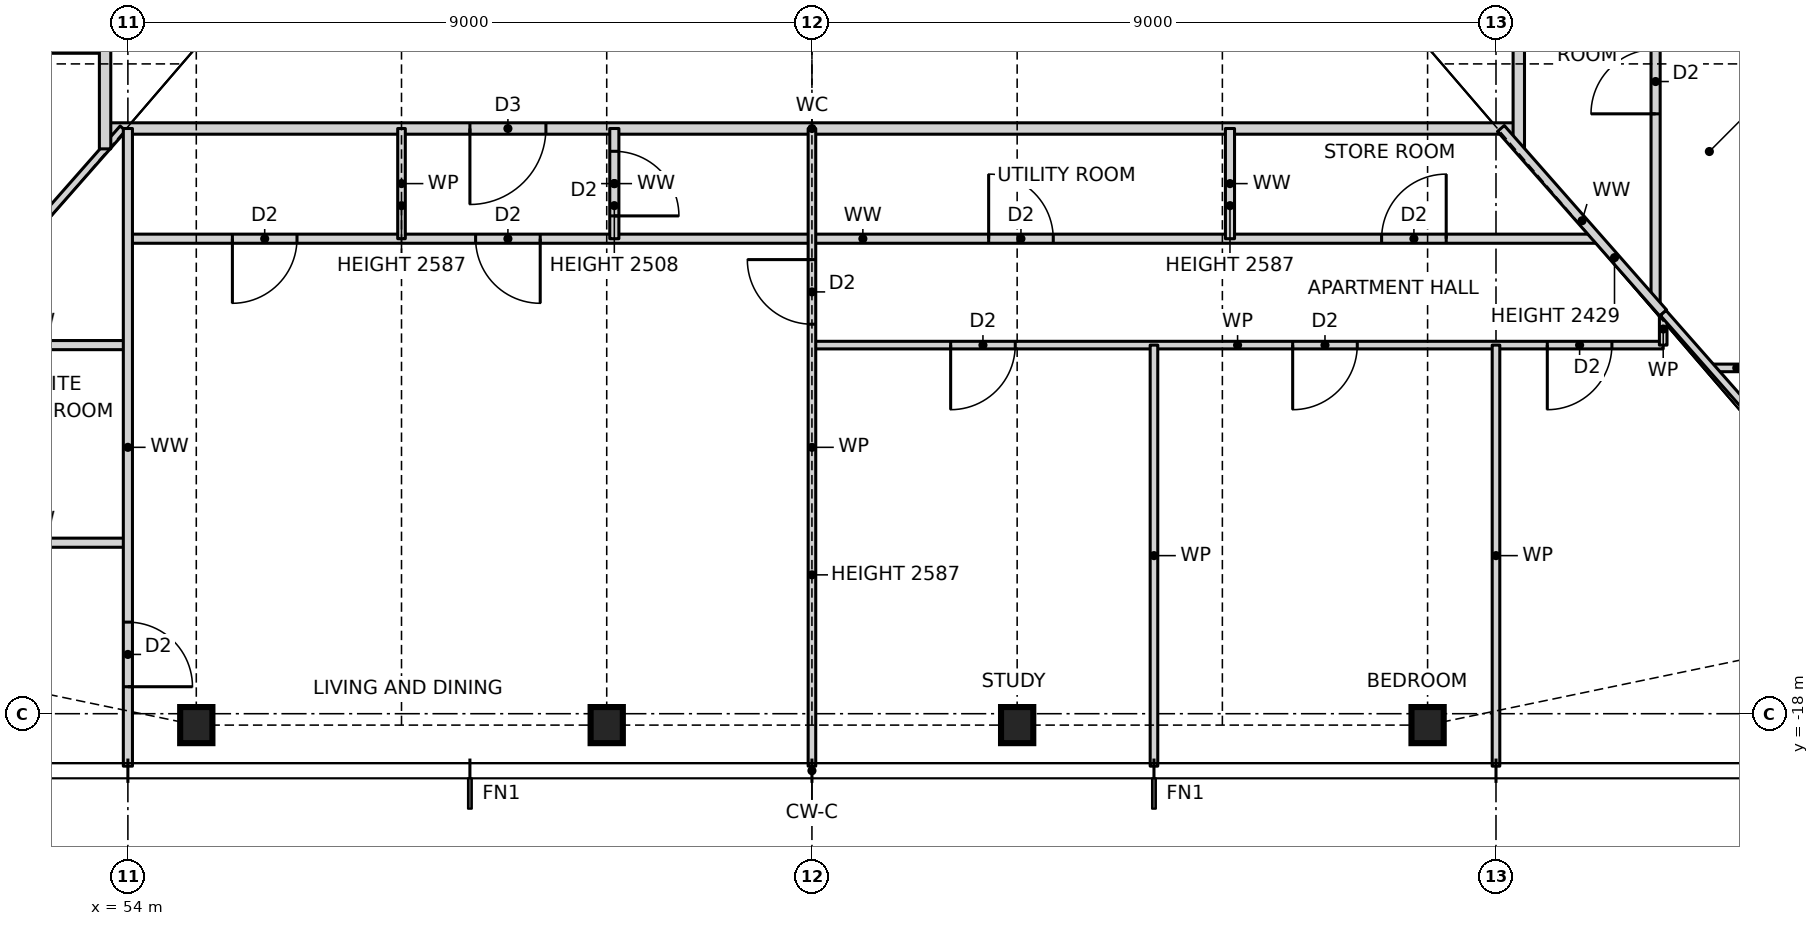
"""IFC4 building model, lengths in metres.
Left out: names, types, materials, properties, quantities, classifications, styles, units other than length and angle.
Written with IfcOpenShell. Run it as: python <this file> out.ifc"""

import sys

from ifc_helpers import new_model, si_unit, direction, frame, frame_2d, origin, origin_2d, place, context, subcontext, project, spatial, rectangle, i_section, extrude, element, fill, save


model = new_model("IFC4")
c1 = context("Model", 3, precision=1e-05, world=origin(), true_north=direction((0.0, 1.0)))
c2 = subcontext(c1, "Body", "Model", "MODEL_VIEW")
j1 = project(units=[si_unit("LENGTHUNIT", "METRE"), si_unit("PLANEANGLEUNIT", "RADIAN")], contexts=[c1])
p1 = place(None, origin())
s1 = spatial("IfcSite", under=j1, at=p1, CompositionType="ELEMENT")
p2 = place(p1, origin())
s2 = spatial("IfcBuilding", under=s1, at=p2, CompositionType="ELEMENT")
p3 = place(p2, frame((0.0, 0.0, 46.5)))
s3 = spatial("IfcBuildingStorey", under=s2, at=p3, CompositionType="ELEMENT", Elevation=46.5)
for number, where, z_axis, x_axis in (
    (1, (54.9, -18.15, 0.0), (0.0, 0.0, 1.0), (1.0, 0.0, 0.0)),
    (2, (60.3, -18.15, 0.0), (0.0, 0.0, 1.0), (1.0, 0.0, 0.0)),
    (3, (65.7, -18.15, 0.0), (0.0, 0.0, 1.0), (1.0, 0.0, 0.0)),
    (4, (71.1, -18.15, 0.0), (0.0, 0.0, 1.0), (1.0, 0.0, 0.0)),
):
    element("IfcColumn", number, at=place(p3, frame(where, z_axis=z_axis, x_axis=x_axis)), inside=s3, PredefinedType="COLUMN", context=c2, shape_type="SweptSolid", body=[
        extrude(i_section(OverallWidth=0.424, OverallDepth=0.475, WebThickness=0.048, FlangeThickness=0.077, at=origin_2d()), origin(), (0.0, 0.0, 1.0), 3.5),
    ])
p4 = place(p3, frame((51.6, -15.75, 0.0), z_axis=(0.0, 0.0, 1.0), x_axis=(1.0, 0.0, 0.0)))
e5 = element("IfcWall", 5, at=p4, inside=s3, PredefinedType="PARTITIONING", context=c2, shape_type="SweptSolid", body=[
    extrude(rectangle(XDim=2.4, YDim=0.12, at=frame_2d((1.2, 0.0))), origin(), (0.0, 0.0, 1.0), 3.27),
])
p5 = place(p3, frame((74.836, -13.45, 0.0), z_axis=(0.0, 0.0, 1.0), x_axis=(1.0, 0.0, 0.0)))
e6 = element("IfcWall", 6, at=p5, inside=s3, PredefinedType="PARTITIONING", context=c2, shape_type="SweptSolid", body=[
    extrude(rectangle(XDim=0.664, YDim=0.1, at=frame_2d((0.332, 0.0))), origin(), (0.0, 0.0, 1.0), 3.27),
])
p6 = place(p3, frame((51.6, -13.15, 0.0), z_axis=(0.0, 0.0, 1.0), x_axis=(1.0, 0.0, 0.0)))
e7 = element("IfcWall", 7, at=p6, inside=s3, PredefinedType="PARTITIONING", context=c2, shape_type="SweptSolid", body=[
    extrude(rectangle(XDim=2.4, YDim=0.12, at=frame_2d((1.2, 0.0))), origin(), (0.0, 0.0, 1.0), 3.27),
])
p7 = place(p3, frame((63.0, -13.15, 0.0), z_axis=(0.0, 0.0, 1.0), x_axis=(1.0, 0.0, 0.0)))
e8 = element("IfcWall", 8, at=p7, inside=s3, PredefinedType="PARTITIONING", context=c2, shape_type="SweptSolid", body=[
    extrude(rectangle(XDim=11.2, YDim=0.1, at=frame_2d((5.6, 0.0))), origin(), (0.0, 0.0, 1.0), 3.27),
])
p8 = place(p7, frame((1.825, 0.0, 0.0)))
e9 = element("IfcOpeningElement", 9, at=p8, cuts=e8, PredefinedType="OPENING", context=c2, shape_type="SweptSolid", body=[
    extrude(rectangle(XDim=0.85, YDim=2.1, at=frame_2d((0.425, 1.05))), frame((0.0, 0.06, 0.0), z_axis=(0.0, -1.0, 0.0), x_axis=(1.0, 0.0, 0.0)), (0.0, 0.0, 1.0), 0.12),
])
p9 = place(p7, frame((6.325, 0.0, 0.0)))
e10 = element("IfcOpeningElement", 10, at=p9, cuts=e8, PredefinedType="OPENING", context=c2, shape_type="SweptSolid", body=[
    extrude(rectangle(XDim=0.85, YDim=2.1, at=frame_2d((0.425, 1.05))), frame((0.0, 0.06, 0.0), z_axis=(0.0, -1.0, 0.0), x_axis=(1.0, 0.0, 0.0)), (0.0, 0.0, 1.0), 0.12),
])
p10 = place(p7, frame((9.675, 0.0, 0.0)))
e11 = element("IfcOpeningElement", 11, at=p10, cuts=e8, PredefinedType="OPENING", context=c2, shape_type="SweptSolid", body=[
    extrude(rectangle(XDim=0.85, YDim=2.1, at=frame_2d((0.425, 1.05))), frame((0.0, 0.06, 0.0), z_axis=(0.0, -1.0, 0.0), x_axis=(1.0, 0.0, 0.0)), (0.0, 0.0, 1.0), 0.12),
])
p11 = place(p3, frame((54.0, -11.75, 0.0), z_axis=(0.0, 0.0, 1.0), x_axis=(1.0, 0.0, 0.0)))
e12 = element("IfcWall", 12, at=p11, inside=s3, PredefinedType="PARTITIONING", context=c2, shape_type="SweptSolid", body=[
    extrude(rectangle(XDim=19.34, YDim=0.12, at=frame_2d((9.67, 0.0))), origin(), (0.0, 0.0, 1.0), 3.27),
])
p12 = place(p11, frame((1.375, 0.0, 0.0)))
e13 = element("IfcOpeningElement", 13, at=p12, cuts=e12, PredefinedType="OPENING", context=c2, shape_type="SweptSolid", body=[
    extrude(rectangle(XDim=0.85, YDim=2.1, at=frame_2d((0.425, 1.05))), frame((0.0, 0.07, 0.0), z_axis=(0.0, -1.0, 0.0), x_axis=(1.0, 0.0, 0.0)), (0.0, 0.0, 1.0), 0.14),
])
p13 = place(p11, frame((4.575, 0.0, 0.0)))
e14 = element("IfcOpeningElement", 14, at=p13, cuts=e12, PredefinedType="OPENING", context=c2, shape_type="SweptSolid", body=[
    extrude(rectangle(XDim=0.85, YDim=2.1, at=frame_2d((0.425, 1.05))), frame((0.0, 0.07, 0.0), z_axis=(0.0, -1.0, 0.0), x_axis=(1.0, 0.0, 0.0)), (0.0, 0.0, 1.0), 0.14),
])
p14 = place(p11, frame((11.325, 0.0, 0.0)))
e15 = element("IfcOpeningElement", 15, at=p14, cuts=e12, PredefinedType="OPENING", context=c2, shape_type="SweptSolid", body=[
    extrude(rectangle(XDim=0.85, YDim=2.1, at=frame_2d((0.425, 1.05))), frame((0.0, 0.07, 0.0), z_axis=(0.0, -1.0, 0.0), x_axis=(1.0, 0.0, 0.0)), (0.0, 0.0, 1.0), 0.14),
])
p15 = place(p11, frame((16.495, 0.0, 0.0)))
e16 = element("IfcOpeningElement", 16, at=p15, cuts=e12, PredefinedType="OPENING", context=c2, shape_type="SweptSolid", body=[
    extrude(rectangle(XDim=0.85, YDim=2.1, at=frame_2d((0.425, 1.05))), frame((0.0, 0.07, 0.0), z_axis=(0.0, -1.0, 0.0), x_axis=(1.0, 0.0, 0.0)), (0.0, 0.0, 1.0), 0.14),
])
p16 = place(p3, frame((53.7, -10.3, 0.0), z_axis=(0.0, 0.0, 1.0), x_axis=(1.0, 0.0, 0.0)))
e17 = element("IfcWall", 17, at=p16, inside=s3, PredefinedType="PARTITIONING", context=c2, shape_type="SweptSolid", body=[
    extrude(rectangle(XDim=18.6, YDim=0.15, at=frame_2d((9.3, 0.0))), origin(), (0.0, 0.0, 1.0), 3.27),
])
p17 = place(p16, frame((4.8, 0.0, 0.0)))
e18 = element("IfcOpeningElement", 18, at=p17, cuts=e17, PredefinedType="OPENING", context=c2, shape_type="SweptSolid", body=[
    extrude(rectangle(XDim=1.0, YDim=2.1, at=frame_2d((0.5, 1.05))), frame((0.0, 0.085, 0.0), z_axis=(0.0, -1.0, 0.0), x_axis=(1.0, 0.0, 0.0)), (0.0, 0.0, 1.0), 0.17),
])
p18 = place(p3, frame((51.9, -9.25, 0.0), z_axis=(0.0, 0.0, 1.0), x_axis=(1.0, 0.0, 0.0)))
e19 = element("IfcWall", 19, at=p18, inside=s3, PredefinedType="PARTITIONING", context=c2, shape_type="SweptSolid", body=[
    extrude(rectangle(XDim=1.8, YDim=0.12, at=frame_2d((0.9, 0.0))), origin(), (0.0, 0.0, 1.0), 3.27),
])
p19 = place(p3, frame((47.944, -17.109, 0.0), z_axis=(0.0, 0.0, 1.0), x_axis=(0.660638210404, 0.750704439146, 0.0)))
e20 = element("IfcWall", 20, at=p19, inside=s3, PredefinedType="PARTITIONING", context=c2, shape_type="SweptSolid", body=[
    extrude(rectangle(XDim=9.07, YDim=0.1, at=frame_2d((4.535, 0.0))), origin(), (0.0, 0.0, 1.0), 2.429),
])
p20 = place(p3, frame((74.2, -13.15, 0.0), z_axis=(0.0, 0.0, 1.0), x_axis=(0.0, 1.0, 0.0)))
e21 = element("IfcWall", 21, at=p20, inside=s3, PredefinedType="PARTITIONING", context=c2, shape_type="SweptSolid", body=[
    extrude(rectangle(XDim=0.423, YDim=0.1, at=frame_2d((0.211, 0.0))), origin(), (0.0, 0.0, 1.0), 3.27),
])
p21 = place(p3, frame((74.1, -12.614, 0.0), z_axis=(0.0, 0.0, 1.0), x_axis=(0.0, 1.0, 0.0)))
e22 = element("IfcWall", 22, at=p21, inside=s3, PredefinedType="PARTITIONING", context=c2, shape_type="SweptSolid", body=[
    extrude(rectangle(XDim=25.228, YDim=0.12, at=frame_2d((12.614, 0.0))), origin(), (0.0, 0.0, 1.0), 3.27),
])
p22 = place(p21, frame((7.239, 0.0, 0.0)))
e23 = element("IfcOpeningElement", 23, at=p22, cuts=e22, PredefinedType="OPENING", context=c2, shape_type="SweptSolid", body=[
    extrude(rectangle(XDim=0.85, YDim=2.1, at=frame_2d((0.425, 1.05))), frame((0.0, 0.07, 0.0), z_axis=(0.0, -1.0, 0.0), x_axis=(1.0, 0.0, 0.0)), (0.0, 0.0, 1.0), 0.14),
])
p23 = place(p21, frame((10.439, 0.0, 0.0)))
e24 = element("IfcOpeningElement", 24, at=p23, cuts=e22, PredefinedType="OPENING", context=c2, shape_type="SweptSolid", body=[
    extrude(rectangle(XDim=0.85, YDim=2.1, at=frame_2d((0.425, 1.05))), frame((0.0, 0.07, 0.0), z_axis=(0.0, -1.0, 0.0), x_axis=(1.0, 0.0, 0.0)), (0.0, 0.0, 1.0), 0.14),
])
p24 = place(p21, frame((2.507, 0.0, 0.0)))
e25 = element("IfcOpeningElement", 25, at=p24, cuts=e22, PredefinedType="OPENING", context=c2, shape_type="SweptSolid", body=[
    extrude(rectangle(XDim=0.85, YDim=2.1, at=frame_2d((0.425, 1.05))), frame((0.0, 0.07, 0.0), z_axis=(0.0, -1.0, 0.0), x_axis=(1.0, 0.0, 0.0)), (0.0, 0.0, 1.0), 0.14),
])
p25 = place(p21, frame((16.639, 0.0, 0.0)))
e26 = element("IfcOpeningElement", 26, at=p25, cuts=e22, PredefinedType="OPENING", context=c2, shape_type="SweptSolid", body=[
    extrude(rectangle(XDim=0.85, YDim=2.1, at=frame_2d((0.425, 1.05))), frame((0.0, 0.07, 0.0), z_axis=(0.0, -1.0, 0.0), x_axis=(1.0, 0.0, 0.0)), (0.0, 0.0, 1.0), 0.14),
])
p26 = place(p21, frame((21.821, 0.0, 0.0)))
e27 = element("IfcOpeningElement", 27, at=p26, cuts=e22, PredefinedType="OPENING", context=c2, shape_type="SweptSolid", body=[
    extrude(rectangle(XDim=0.85, YDim=2.1, at=frame_2d((0.425, 1.05))), frame((0.0, 0.07, 0.0), z_axis=(0.0, -1.0, 0.0), x_axis=(1.0, 0.0, 0.0)), (0.0, 0.0, 1.0), 0.14),
])
p27 = place(p3, frame((72.3, -10.568, 0.0), z_axis=(0.0, 0.0, 1.0), x_axis=(0.0, 1.0, 0.0)))
e28 = element("IfcWall", 28, at=p27, inside=s3, PredefinedType="PARTITIONING", context=c2, shape_type="SweptSolid", body=[
    extrude(rectangle(XDim=21.136, YDim=0.15, at=frame_2d((10.568, 0.0))), origin(), (0.0, 0.0, 1.0), 3.27),
])
p28 = place(p27, frame((8.318, 0.0, 0.0)))
e29 = element("IfcOpeningElement", 29, at=p28, cuts=e28, PredefinedType="OPENING", context=c2, shape_type="SweptSolid", body=[
    extrude(rectangle(XDim=1.0, YDim=2.1, at=frame_2d((0.5, 1.05))), frame((0.0, 0.085, 0.0), z_axis=(0.0, -1.0, 0.0), x_axis=(1.0, 0.0, 0.0)), (0.0, 0.0, 1.0), 0.17),
])
p29 = place(p3, frame((72.0, -18.69, 0.0), z_axis=(0.0, 0.0, 1.0), x_axis=(0.0, 1.0, 0.0)))
e30 = element("IfcWall", 30, at=p29, inside=s3, PredefinedType="PARTITIONING", context=c2, shape_type="SweptSolid", body=[
    extrude(rectangle(XDim=5.54, YDim=0.1, at=frame_2d((2.77, 0.0))), origin(), (0.0, 0.0, 1.0), 3.27),
])
p30 = place(p3, frame((68.5, -11.75, 0.0), z_axis=(0.0, 0.0, 1.0), x_axis=(0.0, 1.0, 0.0)))
e31 = element("IfcWall", 31, at=p30, inside=s3, PredefinedType="PARTITIONING", context=c2, shape_type="SweptSolid", body=[
    extrude(rectangle(XDim=1.45, YDim=0.12, at=frame_2d((0.725, 0.0))), origin(), (0.0, 0.0, 1.0), 2.587),
])
p31 = place(p3, frame((67.5, -18.69, 0.0), z_axis=(0.0, 0.0, 1.0), x_axis=(0.0, 1.0, 0.0)))
e32 = element("IfcWall", 32, at=p31, inside=s3, PredefinedType="PARTITIONING", context=c2, shape_type="SweptSolid", body=[
    extrude(rectangle(XDim=5.54, YDim=0.1, at=frame_2d((2.77, 0.0))), origin(), (0.0, 0.0, 1.0), 3.27),
])
p32 = place(p3, frame((63.0, -18.69, 0.0), z_axis=(0.0, 0.0, 1.0), x_axis=(0.0, 1.0, 0.0)))
e33 = element("IfcWall", 33, at=p32, inside=s3, PredefinedType="PARTITIONING", context=c2, shape_type="SweptSolid", body=[
    extrude(rectangle(XDim=8.39, YDim=0.1, at=frame_2d((4.195, 0.0))), origin(), (0.0, 0.0, 1.0), 2.587),
])
p33 = place(p32, frame((5.815, 0.0, 0.0)))
e34 = element("IfcOpeningElement", 34, at=p33, cuts=e33, PredefinedType="OPENING", context=c2, shape_type="SweptSolid", body=[
    extrude(rectangle(XDim=0.85, YDim=2.1, at=frame_2d((0.425, 1.05))), frame((0.0, 0.06, 0.0), z_axis=(0.0, -1.0, 0.0), x_axis=(1.0, 0.0, 0.0)), (0.0, 0.0, 1.0), 0.12),
])
p34 = place(p3, frame((60.4, -11.75, 0.0), z_axis=(0.0, 0.0, 1.0), x_axis=(0.0, 1.0, 0.0)))
e35 = element("IfcWall", 35, at=p34, inside=s3, PredefinedType="PARTITIONING", context=c2, shape_type="SweptSolid", body=[
    extrude(rectangle(XDim=1.45, YDim=0.12, at=frame_2d((0.725, 0.0))), origin(), (0.0, 0.0, 1.0), 2.508),
])
p35 = place(p34, frame((0.3, 0.0, 0.0)))
e36 = element("IfcOpeningElement", 36, at=p35, cuts=e35, PredefinedType="OPENING", context=c2, shape_type="SweptSolid", body=[
    extrude(rectangle(XDim=0.85, YDim=2.1, at=frame_2d((0.425, 1.05))), frame((0.0, 0.07, 0.0), z_axis=(0.0, -1.0, 0.0), x_axis=(1.0, 0.0, 0.0)), (0.0, 0.0, 1.0), 0.14),
])
p36 = place(p3, frame((57.6, -11.75, 0.0), z_axis=(0.0, 0.0, 1.0), x_axis=(0.0, 1.0, 0.0)))
e37 = element("IfcWall", 37, at=p36, inside=s3, PredefinedType="PARTITIONING", context=c2, shape_type="SweptSolid", body=[
    extrude(rectangle(XDim=1.45, YDim=0.1, at=frame_2d((0.725, 0.0))), origin(), (0.0, 0.0, 1.0), 2.587),
])
p37 = place(p3, frame((54.0, -18.69, 0.0), z_axis=(0.0, 0.0, 1.0), x_axis=(0.0, 1.0, 0.0)))
e38 = element("IfcWall", 38, at=p37, inside=s3, PredefinedType="PARTITIONING", context=c2, shape_type="SweptSolid", body=[
    extrude(rectangle(XDim=8.39, YDim=0.12, at=frame_2d((4.195, 0.0))), origin(), (0.0, 0.0, 1.0), 3.27),
])
p38 = place(p37, frame((1.045, 0.0, 0.0)))
e39 = element("IfcOpeningElement", 39, at=p38, cuts=e38, PredefinedType="OPENING", context=c2, shape_type="SweptSolid", body=[
    extrude(rectangle(XDim=0.85, YDim=2.1, at=frame_2d((0.425, 1.05))), frame((0.0, 0.07, 0.0), z_axis=(0.0, -1.0, 0.0), x_axis=(1.0, 0.0, 0.0)), (0.0, 0.0, 1.0), 0.14),
])
p39 = place(p3, frame((53.7, -10.568, 0.0), z_axis=(0.0, 0.0, 1.0), x_axis=(0.0, 1.0, 0.0)))
e40 = element("IfcWall", 40, at=p39, inside=s3, PredefinedType="PARTITIONING", context=c2, shape_type="SweptSolid", body=[
    extrude(rectangle(XDim=21.136, YDim=0.15, at=frame_2d((10.568, 0.0))), origin(), (0.0, 0.0, 1.0), 3.27),
])
p40 = place(p39, frame((16.318, 0.0, 0.0)))
e41 = element("IfcOpeningElement", 41, at=p40, cuts=e40, PredefinedType="OPENING", context=c2, shape_type="SweptSolid", body=[
    extrude(rectangle(XDim=1.0, YDim=2.1, at=frame_2d((0.5, 1.05))), frame((0.0, 0.085, 0.0), z_axis=(0.0, -1.0, 0.0), x_axis=(1.0, 0.0, 0.0)), (0.0, 0.0, 1.0), 0.17),
])
p41 = place(p39, frame((10.918, 0.0, 0.0)))
e42 = element("IfcOpeningElement", 42, at=p41, cuts=e40, PredefinedType="OPENING", context=c2, shape_type="SweptSolid", body=[
    extrude(rectangle(XDim=1.0, YDim=2.1, at=frame_2d((0.5, 1.05))), frame((0.0, 0.085, 0.0), z_axis=(0.0, -1.0, 0.0), x_axis=(1.0, 0.0, 0.0)), (0.0, 0.0, 1.0), 0.17),
])
p42 = place(p3, frame((74.2, -12.727, 0.0), z_axis=(0.0, 0.0, 1.0), x_axis=(-0.660667046586, 0.75067906162, 0.0)))
e43 = element("IfcWall", 43, at=p42, inside=s3, PredefinedType="PARTITIONING", context=c2, shape_type="SweptSolid", body=[
    extrude(rectangle(XDim=3.233, YDim=0.12, at=frame_2d((1.617, 0.0))), origin(), (0.0, 0.0, 1.0), 2.429),
])
p43 = place(p3, frame((78.057, -17.109, 0.0), z_axis=(0.0, 0.0, 1.0), x_axis=(-0.660698595885, 0.750651294141, 0.0)))
e44 = element("IfcWall", 44, at=p43, inside=s3, PredefinedType="PARTITIONING", context=c2, shape_type="SweptSolid", body=[
    extrude(rectangle(XDim=5.838, YDim=0.1, at=frame_2d((2.919, 0.0))), origin(), (0.0, 0.0, 1.0), 2.429),
])
p44 = place(p12, frame((0.85, 0.0, 0.0), z_axis=(0.0, 0.0, 1.0), x_axis=(-1.0, 0.0, 0.0)))
e45 = element("IfcDoor", 45, at=p44, inside=s3, OperationType="SINGLE_SWING_RIGHT", PredefinedType="DOOR", context=c2, shape_type="SweptSolid", body=[
    extrude(rectangle(XDim=0.85, YDim=2.1, at=frame_2d((0.425, 1.05))), frame((0.0, 0.025, 0.0), z_axis=(0.0, -1.0, 0.0), x_axis=(1.0, 0.0, 0.0)), (0.0, 0.0, 1.0), 0.05),
])
fill(e13, e45)
p45 = place(p17, frame((1.0, 0.0, 0.0), z_axis=(0.0, 0.0, 1.0), x_axis=(-1.0, 0.0, 0.0)))
e46 = element("IfcDoor", 46, at=p45, inside=s3, OperationType="SINGLE_SWING_RIGHT", PredefinedType="DOOR", context=c2, shape_type="SweptSolid", body=[
    extrude(rectangle(XDim=1.0, YDim=2.1, at=frame_2d((0.5, 1.05))), frame((0.0, 0.025, 0.0), z_axis=(0.0, -1.0, 0.0), x_axis=(1.0, 0.0, 0.0)), (0.0, 0.0, 1.0), 0.05),
])
fill(e18, e46)
p46 = place(p13, frame((0.85, 0.0, 0.0), z_axis=(0.0, 0.0, 1.0), x_axis=(-1.0, 0.0, 0.0)))
e47 = element("IfcDoor", 47, at=p46, inside=s3, OperationType="SINGLE_SWING_LEFT", PredefinedType="DOOR", context=c2, shape_type="SweptSolid", body=[
    extrude(rectangle(XDim=0.85, YDim=2.1, at=frame_2d((0.425, 1.05))), frame((0.0, 0.025, 0.0), z_axis=(0.0, -1.0, 0.0), x_axis=(1.0, 0.0, 0.0)), (0.0, 0.0, 1.0), 0.05),
])
fill(e14, e47)
p47 = place(p35, frame((0.85, 0.0, 0.0), z_axis=(0.0, 0.0, 1.0), x_axis=(-1.0, 0.0, 0.0)))
e48 = element("IfcDoor", 48, at=p47, inside=s3, OperationType="SINGLE_SWING_RIGHT", PredefinedType="DOOR", context=c2, shape_type="SweptSolid", body=[
    extrude(rectangle(XDim=0.85, YDim=2.1, at=frame_2d((0.425, 1.05))), frame((0.0, 0.025, 0.0), z_axis=(0.0, -1.0, 0.0), x_axis=(1.0, 0.0, 0.0)), (0.0, 0.0, 1.0), 0.05),
])
fill(e36, e48)
p48 = place(p38, frame((0.85, 0.0, 0.0), z_axis=(0.0, 0.0, 1.0), x_axis=(-1.0, 0.0, 0.0)))
e49 = element("IfcDoor", 49, at=p48, inside=s3, OperationType="SINGLE_SWING_RIGHT", PredefinedType="DOOR", context=c2, shape_type="SweptSolid", body=[
    extrude(rectangle(XDim=0.85, YDim=2.1, at=frame_2d((0.425, 1.05))), frame((0.0, 0.025, 0.0), z_axis=(0.0, -1.0, 0.0), x_axis=(1.0, 0.0, 0.0)), (0.0, 0.0, 1.0), 0.05),
])
fill(e39, e49)
p49 = place(p33, origin())
e50 = element("IfcDoor", 50, at=p49, inside=s3, OperationType="SINGLE_SWING_RIGHT", PredefinedType="DOOR", context=c2, shape_type="SweptSolid", body=[
    extrude(rectangle(XDim=0.85, YDim=2.1, at=frame_2d((0.425, 1.05))), frame((0.0, 0.025, 0.0), z_axis=(0.0, -1.0, 0.0), x_axis=(1.0, 0.0, 0.0)), (0.0, 0.0, 1.0), 0.05),
])
fill(e34, e50)
p50 = place(p8, frame((0.85, 0.0, 0.0), z_axis=(0.0, 0.0, 1.0), x_axis=(-1.0, 0.0, 0.0)))
e51 = element("IfcDoor", 51, at=p50, inside=s3, OperationType="SINGLE_SWING_RIGHT", PredefinedType="DOOR", context=c2, shape_type="SweptSolid", body=[
    extrude(rectangle(XDim=0.85, YDim=2.1, at=frame_2d((0.425, 1.05))), frame((0.0, 0.025, 0.0), z_axis=(0.0, -1.0, 0.0), x_axis=(1.0, 0.0, 0.0)), (0.0, 0.0, 1.0), 0.05),
])
fill(e9, e51)
p51 = place(p9, frame((0.85, 0.0, 0.0), z_axis=(0.0, 0.0, 1.0), x_axis=(-1.0, 0.0, 0.0)))
e52 = element("IfcDoor", 52, at=p51, inside=s3, OperationType="SINGLE_SWING_RIGHT", PredefinedType="DOOR", context=c2, shape_type="SweptSolid", body=[
    extrude(rectangle(XDim=0.85, YDim=2.1, at=frame_2d((0.425, 1.05))), frame((0.0, 0.025, 0.0), z_axis=(0.0, -1.0, 0.0), x_axis=(1.0, 0.0, 0.0)), (0.0, 0.0, 1.0), 0.05),
])
fill(e10, e52)
p52 = place(p10, frame((0.85, 0.0, 0.0), z_axis=(0.0, 0.0, 1.0), x_axis=(-1.0, 0.0, 0.0)))
e53 = element("IfcDoor", 53, at=p52, inside=s3, OperationType="SINGLE_SWING_RIGHT", PredefinedType="DOOR", context=c2, shape_type="SweptSolid", body=[
    extrude(rectangle(XDim=0.85, YDim=2.1, at=frame_2d((0.425, 1.05))), frame((0.0, 0.025, 0.0), z_axis=(0.0, -1.0, 0.0), x_axis=(1.0, 0.0, 0.0)), (0.0, 0.0, 1.0), 0.05),
])
fill(e11, e53)
p53 = place(p14, origin())
e54 = element("IfcDoor", 54, at=p53, inside=s3, OperationType="SINGLE_SWING_LEFT", PredefinedType="DOOR", context=c2, shape_type="SweptSolid", body=[
    extrude(rectangle(XDim=0.85, YDim=2.1, at=frame_2d((0.425, 1.05))), frame((0.0, 0.025, 0.0), z_axis=(0.0, -1.0, 0.0), x_axis=(1.0, 0.0, 0.0)), (0.0, 0.0, 1.0), 0.05),
])
fill(e15, e54)
p54 = place(p15, origin())
e55 = element("IfcDoor", 55, at=p54, inside=s3, OperationType="SINGLE_SWING_RIGHT", PredefinedType="DOOR", context=c2, shape_type="SweptSolid", body=[
    extrude(rectangle(XDim=0.85, YDim=2.1, at=frame_2d((0.425, 1.05))), frame((0.0, 0.025, 0.0), z_axis=(0.0, -1.0, 0.0), x_axis=(1.0, 0.0, 0.0)), (0.0, 0.0, 1.0), 0.05),
])
fill(e16, e55)
p55 = place(p24, origin())
e56 = element("IfcDoor", 56, at=p55, inside=s3, OperationType="SINGLE_SWING_LEFT", PredefinedType="DOOR", context=c2, shape_type="SweptSolid", body=[
    extrude(rectangle(XDim=0.85, YDim=2.1, at=frame_2d((0.425, 1.05))), frame((0.0, 0.025, 0.0), z_axis=(0.0, -1.0, 0.0), x_axis=(1.0, 0.0, 0.0)), (0.0, 0.0, 1.0), 0.05),
])
fill(e25, e56)
save(model, sys.argv[1])
